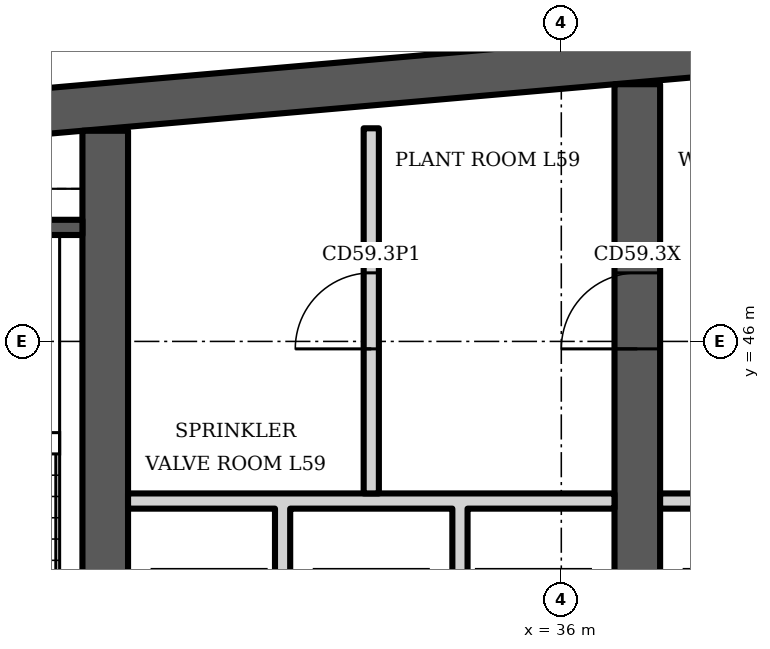
"""IFC4 building model, lengths in metres.
Left out: names, types, materials, properties, quantities, classifications, styles, units other than length and angle.
Written with IfcOpenShell. Run it as: python <this file> out.ifc"""

import sys

from ifc_helpers import new_model, si_unit, direction, frame, frame_2d, origin, place, context, subcontext, project, spatial, polyline, rectangle, outline, extrude, element, fill, save


model = new_model("IFC4")
c1 = context("Model", 3, precision=1e-05, world=origin(), true_north=direction((0.0, 1.0)))
c2 = subcontext(c1, "Body", "Model", "MODEL_VIEW")
j1 = project(units=[si_unit("LENGTHUNIT", "METRE"), si_unit("PLANEANGLEUNIT", "RADIAN")], contexts=[c1])
p1 = place(None, origin())
s1 = spatial("IfcSite", under=j1, at=p1, CompositionType="ELEMENT")
p2 = place(p1, origin())
s2 = spatial("IfcBuilding", under=s1, at=p2, CompositionType="ELEMENT")
p3 = place(p2, frame((0.0, 0.0, 235.9)))
s3 = spatial("IfcBuildingStorey", under=s2, at=p3, CompositionType="ELEMENT", Elevation=235.9)
p4 = place(p3, origin())
e1 = element("IfcWall", 1, at=p4, inside=s3, PredefinedType="SHEAR", context=c2, shape_type="SweptSolid", body=[
    extrude(outline(polyline([(23.0, 48.185), (40.5, 49.716), (58.0, 48.185), (58.0, 48.787), (40.5, 50.318), (23.0, 48.787), (23.0, 48.185)])), origin(), (0.0, 0.0, 1.0), 3.6),
])
p5 = place(p3, frame((30.0, 34.6, 0.0), z_axis=(0.0, 0.0, 1.0), x_axis=(0.0, 1.0, 0.0)))
e2 = element("IfcWall", 2, at=p5, inside=s3, PredefinedType="SHEAR", context=c2, shape_type="SweptSolid", body=[
    extrude(rectangle(XDim=14.171, YDim=0.6, at=frame_2d((7.085, 0.0))), origin(), (0.0, 0.0, 1.0), 3.6),
])
p6 = place(p5, frame((3.8, 0.0, 0.0)))
e3 = element("IfcOpeningElement", 3, at=p6, cuts=e2, PredefinedType="OPENING", context=c2, shape_type="SweptSolid", body=[
    extrude(rectangle(XDim=1.1, YDim=2.1, at=frame_2d((0.55, 1.05))), frame((0.0, 0.31, 0.0), z_axis=(0.0, -1.0, 0.0), x_axis=(1.0, 0.0, 0.0)), (0.0, 0.0, 1.0), 0.62),
])
p7 = place(p3, frame((37.0, 34.6, 0.0), z_axis=(0.0, 0.0, 1.0), x_axis=(0.0, 1.0, 0.0)))
e4 = element("IfcWall", 4, at=p7, inside=s3, PredefinedType="SHEAR", context=c2, shape_type="SweptSolid", body=[
    extrude(rectangle(XDim=14.784, YDim=0.6, at=frame_2d((7.392, 0.0))), origin(), (0.0, 0.0, 1.0), 3.6),
])
p8 = place(p7, frame((11.302, 0.0, 0.0)))
e5 = element("IfcOpeningElement", 5, at=p8, cuts=e4, PredefinedType="OPENING", context=c2, shape_type="SweptSolid", body=[
    extrude(rectangle(XDim=1.0, YDim=2.1, at=frame_2d((0.5, 1.05))), frame((0.0, 0.31, 0.0), z_axis=(0.0, -1.0, 0.0), x_axis=(1.0, 0.0, 0.0)), (0.0, 0.0, 1.0), 0.62),
])
p9 = place(p7, frame((3.8, 0.0, 0.0)))
e6 = element("IfcOpeningElement", 6, at=p9, cuts=e4, PredefinedType="OPENING", context=c2, shape_type="SweptSolid", body=[
    extrude(rectangle(XDim=1.1, YDim=2.1, at=frame_2d((0.55, 1.05))), frame((0.0, 0.31, 0.0), z_axis=(0.0, -1.0, 0.0), x_axis=(1.0, 0.0, 0.0)), (0.0, 0.0, 1.0), 0.62),
])
p10 = place(p3, frame((25.75, 47.5, 0.0), z_axis=(0.0, 0.0, 1.0), x_axis=(1.0, 0.0, 0.0)))
e7 = element("IfcWall", 7, at=p10, inside=s3, PredefinedType="SHEAR", context=c2, shape_type="SweptSolid", body=[
    extrude(rectangle(XDim=3.95, YDim=0.2, at=frame_2d((1.975, 0.0))), origin(), (0.0, 0.0, 1.0), 3.2),
])
p11 = place(p3, origin())
e8 = element("IfcWall", 8, at=p11, inside=s3, PredefinedType="PARTITIONING", context=c2, shape_type="SweptSolid", body=[
    extrude(outline(polyline([(32.433, 40.8), (32.233, 40.8), (32.233, 43.8), (30.3, 43.8), (30.3, 44.0), (36.7, 44.0), (36.7, 43.8), (34.767, 43.8), (34.767, 40.8), (34.567, 40.8), (34.567, 43.8), (32.433, 43.8), (32.433, 40.8)])), origin(), (0.0, 0.0, 1.0), 3.2),
])
p12 = place(p3, frame((33.5, 44.0, 0.0), z_axis=(0.0, 0.0, 1.0), x_axis=(0.0, 1.0, 0.0)))
e9 = element("IfcWall", 9, at=p12, inside=s3, PredefinedType="PARTITIONING", context=c2, shape_type="SweptSolid", body=[
    extrude(rectangle(XDim=4.804, YDim=0.2, at=frame_2d((2.402, 0.0))), origin(), (0.0, 0.0, 1.0), 3.2),
])
p13 = place(p12, frame((1.902, 0.0, 0.0)))
e10 = element("IfcOpeningElement", 10, at=p13, cuts=e9, PredefinedType="OPENING", context=c2, shape_type="SweptSolid", body=[
    extrude(rectangle(XDim=1.0, YDim=2.1, at=frame_2d((0.5, 1.05))), frame((0.0, 0.11, 0.0), z_axis=(0.0, -1.0, 0.0), x_axis=(1.0, 0.0, 0.0)), (0.0, 0.0, 1.0), 0.22),
])
p14 = place(p3, origin())
e11 = element("IfcWall", 11, at=p14, inside=s3, PredefinedType="PARTITIONING", context=c2, shape_type="SweptSolid", body=[
    extrude(outline(polyline([(39.433, 40.8), (39.233, 40.8), (39.233, 43.8), (37.3, 43.8), (37.3, 44.0), (43.7, 44.0), (43.7, 43.8), (41.767, 43.8), (41.767, 40.8), (41.567, 40.8), (41.567, 43.8), (39.433, 43.8), (39.433, 40.8)])), origin(), (0.0, 0.0, 1.0), 3.2),
])
p15 = place(p13, origin())
e12 = element("IfcDoor", 12, at=p15, inside=s3, OperationType="SINGLE_SWING_LEFT", PredefinedType="DOOR", context=c2, shape_type="SweptSolid", body=[
    extrude(rectangle(XDim=1.0, YDim=2.1, at=frame_2d((0.5, 1.05))), frame((0.0, 0.025, 0.0), z_axis=(0.0, -1.0, 0.0), x_axis=(1.0, 0.0, 0.0)), (0.0, 0.0, 1.0), 0.05),
])
fill(e10, e12)
p16 = place(p8, origin())
e13 = element("IfcDoor", 13, at=p16, inside=s3, OperationType="SINGLE_SWING_LEFT", PredefinedType="DOOR", context=c2, shape_type="SweptSolid", body=[
    extrude(rectangle(XDim=1.0, YDim=2.1, at=frame_2d((0.5, 1.05))), frame((0.0, 0.025, 0.0), z_axis=(0.0, -1.0, 0.0), x_axis=(1.0, 0.0, 0.0)), (0.0, 0.0, 1.0), 0.05),
])
fill(e5, e13)
save(model, sys.argv[1])
